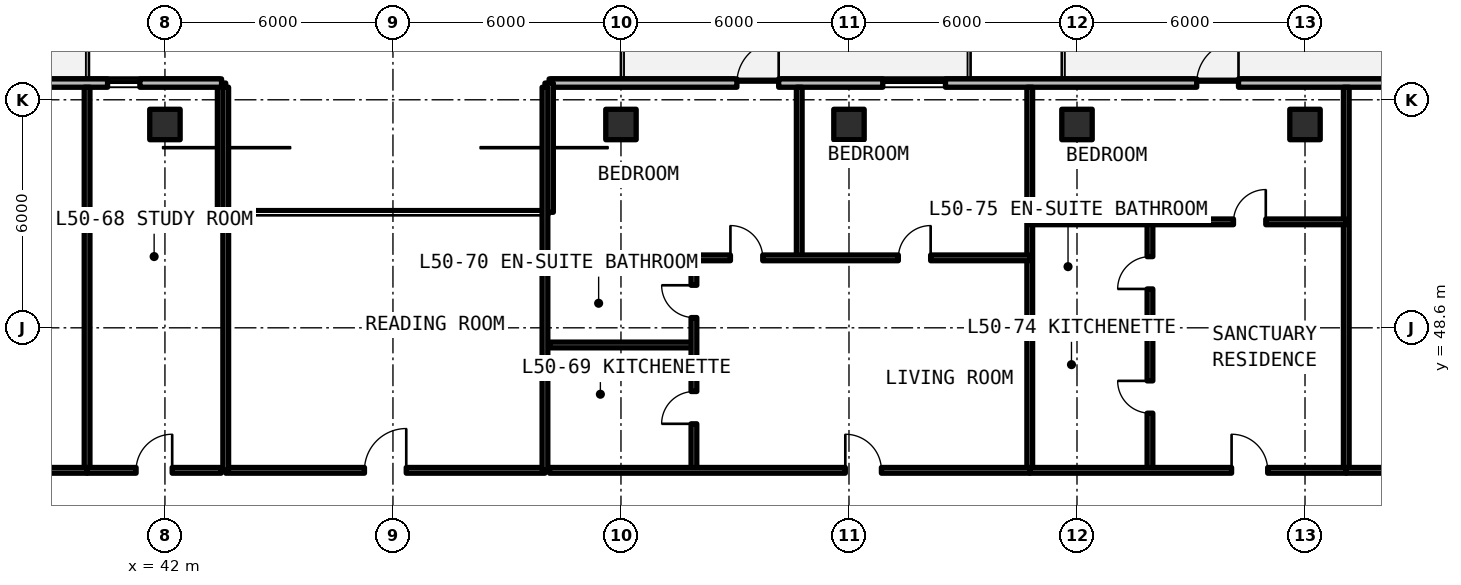
"""IFC4 building model, lengths in metres.
Left out: names, types, materials, properties, quantities, classifications, styles, units other than length and angle.
Written with IfcOpenShell. Run it as: python <this file> out.ifc"""

import sys

from ifc_helpers import new_model, si_unit, direction, frame, frame_2d, origin, origin_2d, place, context, subcontext, project, spatial, rectangle, extrude, element, fill, save


model = new_model("IFC4")
c1 = context("Model", 3, precision=1e-05, world=origin(), true_north=direction((0.0, 1.0)))
c2 = subcontext(c1, "Body", "Model", "MODEL_VIEW")
j1 = project(units=[si_unit("LENGTHUNIT", "METRE"), si_unit("PLANEANGLEUNIT", "RADIAN")], contexts=[c1])
p1 = place(None, origin())
s1 = spatial("IfcSite", under=j1, at=p1, CompositionType="ELEMENT")
p2 = place(p1, origin())
s2 = spatial("IfcBuilding", under=s1, at=p2, CompositionType="ELEMENT")
p3 = place(p2, frame((0.0, 0.0, 181.83)))
s3 = spatial("IfcBuildingStorey", under=s2, at=p3, CompositionType="ELEMENT", Elevation=181.83)
for number, where, z_axis, x_axis in (
    (1, (42.0, 53.95, 0.0), (0.0, 0.0, 1.0), (1.0, 0.0, 0.0)),
    (2, (54.0, 53.95, 0.0), (0.0, 0.0, 1.0), (1.0, 0.0, 0.0)),
    (3, (60.0, 53.95, 0.0), (0.0, 0.0, 1.0), (1.0, 0.0, 0.0)),
    (4, (66.0, 53.95, 0.0), (0.0, 0.0, 1.0), (1.0, 0.0, 0.0)),
    (5, (72.0, 53.95, 0.0), (0.0, 0.0, 1.0), (1.0, 0.0, 0.0)),
):
    element("IfcColumn", number, at=place(p3, frame(where, z_axis=z_axis, x_axis=x_axis)), inside=s3, PredefinedType="COLUMN", context=c2, shape_type="SweptSolid", body=[
        extrude(rectangle(XDim=0.8, YDim=0.8, at=origin_2d()), origin(), (0.0, 0.0, 1.0), 3.3),
    ])
p4 = place(p3, frame((95.354, 55.04, 0.0), z_axis=(0.0, 0.0, 1.0), x_axis=(-1.0, 0.0, 0.0)))
e6 = element("IfcWall", 6, at=p4, inside=s3, PredefinedType="SOLIDWALL", context=c2, shape_type="SweptSolid", body=[
    extrude(rectangle(XDim=43.244, YDim=0.22, at=frame_2d((21.622, 0.0))), origin(), (0.0, 0.0, 1.0), 3.08),
])
p5 = place(p4, frame((37.204, 0.0, 0.0)))
e7 = element("IfcOpeningElement", 7, at=p5, cuts=e6, PredefinedType="OPENING", context=c2, shape_type="SweptSolid", body=[
    extrude(rectangle(XDim=1.1, YDim=2.15, at=frame_2d((0.55, 1.075))), frame((0.0, 0.12, 0.0), z_axis=(0.0, -1.0, 0.0), x_axis=(1.0, 0.0, 0.0)), (0.0, 0.0, 1.0), 0.24),
])
p6 = place(p4, frame((25.104, 0.0, 0.0)))
e8 = element("IfcOpeningElement", 8, at=p6, cuts=e6, PredefinedType="OPENING", context=c2, shape_type="SweptSolid", body=[
    extrude(rectangle(XDim=1.1, YDim=2.15, at=frame_2d((0.55, 1.075))), frame((0.0, 0.12, 0.0), z_axis=(0.0, -1.0, 0.0), x_axis=(1.0, 0.0, 0.0)), (0.0, 0.0, 1.0), 0.24),
])
p7 = place(p4, frame((13.254, 0.0, 0.0)))
e9 = element("IfcOpeningElement", 9, at=p7, cuts=e6, PredefinedType="OPENING", context=c2, shape_type="SweptSolid", body=[
    extrude(rectangle(XDim=1.1, YDim=2.15, at=frame_2d((0.55, 1.075))), frame((0.0, 0.12, 0.0), z_axis=(0.0, -1.0, 0.0), x_axis=(1.0, 0.0, 0.0)), (0.0, 0.0, 1.0), 0.24),
])
p8 = place(p4, frame((32.815, 0.0, 0.78)))
e10 = element("IfcOpeningElement", 10, at=p8, cuts=e6, PredefinedType="OPENING", context=c2, shape_type="SweptSolid", body=[
    extrude(rectangle(XDim=1.65, YDim=1.66, at=frame_2d((0.825, 0.83))), frame((0.0, 0.12, 0.0), z_axis=(0.0, -1.0, 0.0), x_axis=(1.0, 0.0, 0.0)), (0.0, 0.0, 1.0), 0.24),
])
p9 = place(p4, frame((8.458, 0.0, 0.78)))
e11 = element("IfcOpeningElement", 11, at=p9, cuts=e6, PredefinedType="OPENING", context=c2, shape_type="SweptSolid", body=[
    extrude(rectangle(XDim=1.65, YDim=1.66, at=frame_2d((0.825, 0.83))), frame((0.0, 0.12, 0.0), z_axis=(0.0, -1.0, 0.0), x_axis=(1.0, 0.0, 0.0)), (0.0, 0.0, 1.0), 0.24),
])
p10 = place(p4, frame((2.303, 0.0, 0.78)))
e12 = element("IfcOpeningElement", 12, at=p10, cuts=e6, PredefinedType="OPENING", context=c2, shape_type="SweptSolid", body=[
    extrude(rectangle(XDim=1.65, YDim=1.66, at=frame_2d((0.825, 0.83))), frame((0.0, 0.12, 0.0), z_axis=(0.0, -1.0, 0.0), x_axis=(1.0, 0.0, 0.0)), (0.0, 0.0, 1.0), 0.24),
])
for number, where, z_axis, x_axis in (
    (13, (52.11, 55.04, 0.0), (0.0, 0.0, 1.0), (0.0, -1.0, 0.0)),
    (14, (43.49, 51.64, 0.0), (0.0, 0.0, 1.0), (0.0, 1.0, 0.0)),
):
    element("IfcWall", number, at=place(p3, frame(where, z_axis=z_axis, x_axis=x_axis)), inside=s3, PredefinedType="SOLIDWALL", context=c2, shape_type="SweptSolid", body=[
        extrude(rectangle(XDim=3.4, YDim=0.22, at=frame_2d((1.7, 0.0))), origin(), (0.0, 0.0, 1.0), 3.08),
    ])
p11 = place(p3, frame((43.49, 55.04, 0.0), z_axis=(0.0, 0.0, 1.0), x_axis=(-1.0, 0.0, 0.0)))
e15 = element("IfcWall", 15, at=p11, inside=s3, PredefinedType="SOLIDWALL", context=c2, shape_type="SweptSolid", body=[
    extrude(rectangle(XDim=17.644, YDim=0.22, at=frame_2d((8.822, 0.0))), origin(), (0.0, 0.0, 1.0), 3.08),
])
p12 = place(p11, frame((10.29, 0.0, 0.0)))
e16 = element("IfcOpeningElement", 16, at=p12, cuts=e15, PredefinedType="OPENING", context=c2, shape_type="SweptSolid", body=[
    extrude(rectangle(XDim=1.1, YDim=2.15, at=frame_2d((0.55, 1.075))), frame((0.0, 0.12, 0.0), z_axis=(0.0, -1.0, 0.0), x_axis=(1.0, 0.0, 0.0)), (0.0, 0.0, 1.0), 0.24),
])
p13 = place(p11, frame((14.901, 0.0, 0.78)))
e17 = element("IfcOpeningElement", 17, at=p13, cuts=e15, PredefinedType="OPENING", context=c2, shape_type="SweptSolid", body=[
    extrude(rectangle(XDim=1.65, YDim=1.66, at=frame_2d((0.825, 0.83))), frame((0.0, 0.12, 0.0), z_axis=(0.0, -1.0, 0.0), x_axis=(1.0, 0.0, 0.0)), (0.0, 0.0, 1.0), 0.24),
])
p14 = place(p11, frame((4.969, 0.0, 0.78)))
e18 = element("IfcOpeningElement", 18, at=p14, cuts=e15, PredefinedType="OPENING", context=c2, shape_type="SweptSolid", body=[
    extrude(rectangle(XDim=1.65, YDim=1.66, at=frame_2d((0.825, 0.83))), frame((0.0, 0.12, 0.0), z_axis=(0.0, -1.0, 0.0), x_axis=(1.0, 0.0, 0.0)), (0.0, 0.0, 1.0), 0.24),
])
p15 = place(p11, frame((2.149, 0.0, 0.78)))
e19 = element("IfcOpeningElement", 19, at=p15, cuts=e15, PredefinedType="OPENING", context=c2, shape_type="SweptSolid", body=[
    extrude(rectangle(XDim=0.85, YDim=1.65, at=frame_2d((0.425, 0.825))), frame((0.0, 0.12, 0.0), z_axis=(0.0, -1.0, 0.0), x_axis=(1.0, 0.0, 0.0)), (0.0, 0.0, 1.0), 0.24),
])
p16 = place(p3, frame((43.6, 44.85, 0.0), z_axis=(0.0, 0.0, 1.0), x_axis=(1.0, 0.0, 0.0)))
e20 = element("IfcWall", 20, at=p16, inside=s3, PredefinedType="SOLIDWALL", context=c2, shape_type="SweptSolid", body=[
    extrude(rectangle(XDim=8.4, YDim=0.15, at=frame_2d((4.2, 0.0))), origin(), (0.0, 0.0, 1.0), 2.35),
])
p17 = place(p16, frame((3.65, 0.0, 0.0)))
e21 = element("IfcOpeningElement", 21, at=p17, cuts=e20, PredefinedType="OPENING", context=c2, shape_type="SweptSolid", body=[
    extrude(rectangle(XDim=1.1, YDim=2.15, at=frame_2d((0.55, 1.075))), frame((0.0, 0.085, 0.0), z_axis=(0.0, -1.0, 0.0), x_axis=(1.0, 0.0, 0.0)), (0.0, 0.0, 1.0), 0.17),
])
for number, where, z_axis, x_axis in (
    (22, (43.6, 44.85, 0.0), (0.0, 0.0, 1.0), (0.0, 1.0, 0.0)),
    (23, (52.0, 44.85, 0.0), (0.0, 0.0, 1.0), (0.0, 1.0, 0.0)),
    (24, (39.951, 44.85, 0.0), (0.0, 0.0, 1.0), (0.0, 1.0, 0.0)),
):
    element("IfcWall", number, at=place(p3, frame(where, z_axis=z_axis, x_axis=x_axis)), inside=s3, PredefinedType="SOLIDWALL", context=c2, shape_type="SweptSolid", body=[
        extrude(rectangle(XDim=10.08, YDim=0.15, at=frame_2d((5.04, 0.0))), origin(), (0.0, 0.0, 1.0), 2.35),
    ])
p18 = place(p3, frame((33.842, 44.85, 0.0), z_axis=(0.0, 0.0, 1.0), x_axis=(1.0, 0.0, 0.0)))
e25 = element("IfcWall", 25, at=p18, inside=s3, PredefinedType="SOLIDWALL", context=c2, shape_type="SweptSolid", body=[
    extrude(rectangle(XDim=6.11, YDim=0.15, at=frame_2d((3.055, 0.0))), origin(), (0.0, 0.0, 1.0), 2.35),
])
p19 = place(p18, frame((2.58, 0.0, 0.0)))
e26 = element("IfcOpeningElement", 26, at=p19, cuts=e25, PredefinedType="OPENING", context=c2, shape_type="SweptSolid", body=[
    extrude(rectangle(XDim=0.95, YDim=2.15, at=frame_2d((0.475, 1.075))), frame((0.0, 0.085, 0.0), z_axis=(0.0, -1.0, 0.0), x_axis=(1.0, 0.0, 0.0)), (0.0, 0.0, 1.0), 0.17),
])
p20 = place(p3, frame((39.951, 44.85, 0.0), z_axis=(0.0, 0.0, 1.0), x_axis=(1.0, 0.0, 0.0)))
e27 = element("IfcWall", 27, at=p20, inside=s3, PredefinedType="SOLIDWALL", context=c2, shape_type="SweptSolid", body=[
    extrude(rectangle(XDim=3.529, YDim=0.15, at=frame_2d((1.764, 0.0))), origin(), (0.0, 0.0, 1.0), 2.35),
])
p21 = place(p20, frame((1.289, 0.0, 0.0)))
e28 = element("IfcOpeningElement", 28, at=p21, cuts=e27, PredefinedType="OPENING", context=c2, shape_type="SweptSolid", body=[
    extrude(rectangle(XDim=0.95, YDim=2.15, at=frame_2d((0.475, 1.075))), frame((0.0, 0.085, 0.0), z_axis=(0.0, -1.0, 0.0), x_axis=(1.0, 0.0, 0.0)), (0.0, 0.0, 1.0), 0.17),
])
p22 = place(p3, frame((64.757, 44.85, 0.0), z_axis=(0.0, 0.0, 1.0), x_axis=(0.0, 1.0, 0.0)))
e29 = element("IfcWall", 29, at=p22, inside=s3, PredefinedType="SOLIDWALL", context=c2, shape_type="SweptSolid", body=[
    extrude(rectangle(XDim=10.08, YDim=0.15, at=frame_2d((5.04, 0.0))), origin(), (0.0, 0.0, 1.0), 2.35),
])
p23 = place(p3, frame((52.12, 48.148, 0.0), z_axis=(0.0, 0.0, 1.0), x_axis=(1.0, 0.0, 0.0)))
e30 = element("IfcWall", 30, at=p23, inside=s3, PredefinedType="PARTITIONING", context=c2, shape_type="SweptSolid", body=[
    extrude(rectangle(XDim=3.8, YDim=0.15, at=frame_2d((1.9, 0.0))), origin(), (0.0, 0.0, 1.0), 2.35),
])
p24 = place(p3, frame((55.92, 44.85, 0.0), z_axis=(0.0, 0.0, 1.0), x_axis=(0.0, 1.0, 0.0)))
e31 = element("IfcWall", 31, at=p24, inside=s3, PredefinedType="PARTITIONING", context=c2, shape_type="SweptSolid", body=[
    extrude(rectangle(XDim=5.591, YDim=0.15, at=frame_2d((2.795, 0.0))), origin(), (0.0, 0.0, 1.0), 2.35),
])
p25 = place(p24, frame((1.224, 0.0, 0.0)))
e32 = element("IfcOpeningElement", 32, at=p25, cuts=e31, PredefinedType="OPENING", context=c2, shape_type="SweptSolid", body=[
    extrude(rectangle(XDim=0.85, YDim=2.1, at=frame_2d((0.425, 1.05))), frame((0.0, 0.085, 0.0), z_axis=(0.0, -1.0, 0.0), x_axis=(1.0, 0.0, 0.0)), (0.0, 0.0, 1.0), 0.17),
])
p26 = place(p24, frame((4.02, 0.0, 0.0)))
e33 = element("IfcOpeningElement", 33, at=p26, cuts=e31, PredefinedType="OPENING", context=c2, shape_type="SweptSolid", body=[
    extrude(rectangle(XDim=0.85, YDim=2.1, at=frame_2d((0.425, 1.05))), frame((0.0, 0.085, 0.0), z_axis=(0.0, -1.0, 0.0), x_axis=(1.0, 0.0, 0.0)), (0.0, 0.0, 1.0), 0.17),
])
p27 = place(p3, frame((58.691, 50.441, 0.0), z_axis=(0.0, 0.0, 1.0), x_axis=(0.0, 1.0, 0.0)))
e34 = element("IfcWall", 34, at=p27, inside=s3, PredefinedType="PARTITIONING", context=c2, shape_type="SweptSolid", body=[
    extrude(rectangle(XDim=4.489, YDim=0.15, at=frame_2d((2.245, 0.0))), origin(), (0.0, 0.0, 1.0), 2.35),
])
p28 = place(p3, frame((52.12, 50.441, 0.0), z_axis=(0.0, 0.0, 1.0), x_axis=(1.0, 0.0, 0.0)))
e35 = element("IfcWall", 35, at=p28, inside=s3, PredefinedType="PARTITIONING", context=c2, shape_type="SweptSolid", body=[
    extrude(rectangle(XDim=12.637, YDim=0.15, at=frame_2d((6.318, 0.0))), origin(), (0.0, 0.0, 1.0), 2.35),
])
p29 = place(p28, frame((4.76, 0.0, 0.0)))
e36 = element("IfcOpeningElement", 36, at=p29, cuts=e35, PredefinedType="OPENING", context=c2, shape_type="SweptSolid", body=[
    extrude(rectangle(XDim=0.85, YDim=2.1, at=frame_2d((0.425, 1.05))), frame((0.0, 0.085, 0.0), z_axis=(0.0, -1.0, 0.0), x_axis=(1.0, 0.0, 0.0)), (0.0, 0.0, 1.0), 0.17),
])
p30 = place(p28, frame((9.179, 0.0, 0.0)))
e37 = element("IfcOpeningElement", 37, at=p30, cuts=e35, PredefinedType="OPENING", context=c2, shape_type="SweptSolid", body=[
    extrude(rectangle(XDim=0.85, YDim=2.1, at=frame_2d((0.425, 1.05))), frame((0.0, 0.085, 0.0), z_axis=(0.0, -1.0, 0.0), x_axis=(1.0, 0.0, 0.0)), (0.0, 0.0, 1.0), 0.17),
])
p31 = place(p3, frame((52.12, 44.85, 0.0), z_axis=(0.0, 0.0, 1.0), x_axis=(1.0, 0.0, 0.0)))
e38 = element("IfcWall", 38, at=p31, inside=s3, PredefinedType="SOLIDWALL", context=c2, shape_type="SweptSolid", body=[
    extrude(rectangle(XDim=12.637, YDim=0.15, at=frame_2d((6.318, 0.0))), origin(), (0.0, 0.0, 1.0), 2.35),
])
p32 = place(p31, frame((7.783, 0.0, 0.0)))
e39 = element("IfcOpeningElement", 39, at=p32, cuts=e38, PredefinedType="OPENING", context=c2, shape_type="SweptSolid", body=[
    extrude(rectangle(XDim=0.95, YDim=2.15, at=frame_2d((0.475, 1.075))), frame((0.0, 0.085, 0.0), z_axis=(0.0, -1.0, 0.0), x_axis=(1.0, 0.0, 0.0)), (0.0, 0.0, 1.0), 0.17),
])
p33 = place(p3, frame((73.086, 44.85, 0.0), z_axis=(0.0, 0.0, 1.0), x_axis=(0.0, 1.0, 0.0)))
e40 = element("IfcWall", 40, at=p33, inside=s3, PredefinedType="SOLIDWALL", context=c2, shape_type="SweptSolid", body=[
    extrude(rectangle(XDim=10.08, YDim=0.15, at=frame_2d((5.04, 0.0))), origin(), (0.0, 0.0, 1.0), 2.35),
])
p34 = place(p3, frame((64.757, 48.708, 0.0), z_axis=(0.0, 0.0, 1.0), x_axis=(1.0, 0.0, 0.0)))
e41 = element("IfcWall", 41, at=p34, inside=s3, PredefinedType="PARTITIONING", context=c2, shape_type="SweptSolid", body=[
    extrude(rectangle(XDim=3.163, YDim=0.15, at=frame_2d((1.582, 0.0))), origin(), (0.0, 0.0, 1.0), 2.35),
])
p35 = place(p3, frame((67.92, 44.85, 0.0), z_axis=(0.0, 0.0, 1.0), x_axis=(0.0, 1.0, 0.0)))
e42 = element("IfcWall", 42, at=p35, inside=s3, PredefinedType="PARTITIONING", context=c2, shape_type="SweptSolid", body=[
    extrude(rectangle(XDim=6.538, YDim=0.15, at=frame_2d((3.269, 0.0))), origin(), (0.0, 0.0, 1.0), 2.35),
])
p36 = place(p35, frame((1.504, 0.0, 0.0)))
e43 = element("IfcOpeningElement", 43, at=p36, cuts=e42, PredefinedType="OPENING", context=c2, shape_type="SweptSolid", body=[
    extrude(rectangle(XDim=0.85, YDim=2.1, at=frame_2d((0.425, 1.05))), frame((0.0, 0.085, 0.0), z_axis=(0.0, -1.0, 0.0), x_axis=(1.0, 0.0, 0.0)), (0.0, 0.0, 1.0), 0.17),
])
p37 = place(p35, frame((4.773, 0.0, 0.0)))
e44 = element("IfcOpeningElement", 44, at=p37, cuts=e42, PredefinedType="OPENING", context=c2, shape_type="SweptSolid", body=[
    extrude(rectangle(XDim=0.85, YDim=2.1, at=frame_2d((0.425, 1.05))), frame((0.0, 0.085, 0.0), z_axis=(0.0, -1.0, 0.0), x_axis=(1.0, 0.0, 0.0)), (0.0, 0.0, 1.0), 0.17),
])
p38 = place(p3, frame((64.757, 51.388, 0.0), z_axis=(0.0, 0.0, 1.0), x_axis=(1.0, 0.0, 0.0)))
e45 = element("IfcWall", 45, at=p38, inside=s3, PredefinedType="PARTITIONING", context=c2, shape_type="SweptSolid", body=[
    extrude(rectangle(XDim=8.329, YDim=0.15, at=frame_2d((4.165, 0.0))), origin(), (0.0, 0.0, 1.0), 2.35),
])
p39 = place(p38, frame((5.361, 0.0, 0.0)))
e46 = element("IfcOpeningElement", 46, at=p39, cuts=e45, PredefinedType="OPENING", context=c2, shape_type="SweptSolid", body=[
    extrude(rectangle(XDim=0.85, YDim=2.1, at=frame_2d((0.425, 1.05))), frame((0.0, 0.085, 0.0), z_axis=(0.0, -1.0, 0.0), x_axis=(1.0, 0.0, 0.0)), (0.0, 0.0, 1.0), 0.17),
])
p40 = place(p3, frame((64.757, 44.85, 0.0), z_axis=(0.0, 0.0, 1.0), x_axis=(1.0, 0.0, 0.0)))
e47 = element("IfcWall", 47, at=p40, inside=s3, PredefinedType="SOLIDWALL", context=c2, shape_type="SweptSolid", body=[
    extrude(rectangle(XDim=8.329, YDim=0.15, at=frame_2d((4.165, 0.0))), origin(), (0.0, 0.0, 1.0), 2.35),
])
p41 = place(p40, frame((5.311, 0.0, 0.0)))
e48 = element("IfcOpeningElement", 48, at=p41, cuts=e47, PredefinedType="OPENING", context=c2, shape_type="SweptSolid", body=[
    extrude(rectangle(XDim=0.95, YDim=2.15, at=frame_2d((0.475, 1.075))), frame((0.0, 0.085, 0.0), z_axis=(0.0, -1.0, 0.0), x_axis=(1.0, 0.0, 0.0)), (0.0, 0.0, 1.0), 0.17),
])
p42 = place(p3, frame((73.086, 44.85, 0.0), z_axis=(0.0, 0.0, 1.0), x_axis=(1.0, 0.0, 0.0)))
e49 = element("IfcWall", 49, at=p42, inside=s3, PredefinedType="SOLIDWALL", context=c2, shape_type="SweptSolid", body=[
    extrude(rectangle(XDim=9.765, YDim=0.15, at=frame_2d((4.882, 0.0))), origin(), (0.0, 0.0, 1.0), 2.35),
])
p43 = place(p42, frame((4.333, 0.0, 0.0)))
e50 = element("IfcOpeningElement", 50, at=p43, cuts=e49, PredefinedType="OPENING", context=c2, shape_type="SweptSolid", body=[
    extrude(rectangle(XDim=1.1, YDim=2.15, at=frame_2d((0.55, 1.075))), frame((0.0, 0.085, 0.0), z_axis=(0.0, -1.0, 0.0), x_axis=(1.0, 0.0, 0.0)), (0.0, 0.0, 1.0), 0.17),
])
p44 = place(p5, frame((1.1, 0.0, 0.0), z_axis=(0.0, 0.0, 1.0), x_axis=(-1.0, 0.0, 0.0)))
e51 = element("IfcDoor", 51, at=p44, inside=s3, OperationType="SINGLE_SWING_RIGHT", PredefinedType="DOOR", context=c2, shape_type="SweptSolid", body=[
    extrude(rectangle(XDim=1.1, YDim=2.15, at=frame_2d((0.55, 1.075))), frame((0.0, 0.025, 0.0), z_axis=(0.0, -1.0, 0.0), x_axis=(1.0, 0.0, 0.0)), (0.0, 0.0, 1.0), 0.05),
])
fill(e7, e51)
p45 = place(p6, frame((1.1, 0.0, 0.0), z_axis=(0.0, 0.0, 1.0), x_axis=(-1.0, 0.0, 0.0)))
e52 = element("IfcDoor", 52, at=p45, inside=s3, OperationType="SINGLE_SWING_LEFT", PredefinedType="DOOR", context=c2, shape_type="SweptSolid", body=[
    extrude(rectangle(XDim=1.1, YDim=2.15, at=frame_2d((0.55, 1.075))), frame((0.0, 0.025, 0.0), z_axis=(0.0, -1.0, 0.0), x_axis=(1.0, 0.0, 0.0)), (0.0, 0.0, 1.0), 0.05),
])
fill(e8, e52)
p46 = place(p8, origin())
e53 = element("IfcWindow", 53, at=p46, inside=s3, PartitioningType="SINGLE_PANEL", PredefinedType="WINDOW", context=c2, shape_type="SweptSolid", body=[
    extrude(rectangle(XDim=1.65, YDim=1.66, at=frame_2d((0.825, 0.83))), frame((0.0, 0.03, 0.0), z_axis=(0.0, -1.0, 0.0), x_axis=(1.0, 0.0, 0.0)), (0.0, 0.0, 1.0), 0.06),
])
fill(e10, e53)
p47 = place(p15, origin())
e54 = element("IfcWindow", 54, at=p47, inside=s3, PartitioningType="SINGLE_PANEL", PredefinedType="WINDOW", context=c2, shape_type="SweptSolid", body=[
    extrude(rectangle(XDim=0.85, YDim=1.65, at=frame_2d((0.425, 0.825))), frame((0.0, 0.03, 0.0), z_axis=(0.0, -1.0, 0.0), x_axis=(1.0, 0.0, 0.0)), (0.0, 0.0, 1.0), 0.06),
])
fill(e19, e54)
p48 = place(p17, origin())
e55 = element("IfcDoor", 55, at=p48, inside=s3, OperationType="SINGLE_SWING_RIGHT", PredefinedType="DOOR", context=c2, shape_type="SweptSolid", body=[
    extrude(rectangle(XDim=1.1, YDim=2.15, at=frame_2d((0.55, 1.075))), frame((0.0, 0.025, 0.0), z_axis=(0.0, -1.0, 0.0), x_axis=(1.0, 0.0, 0.0)), (0.0, 0.0, 1.0), 0.05),
])
fill(e21, e55)
p49 = place(p21, origin())
e56 = element("IfcDoor", 56, at=p49, inside=s3, OperationType="SINGLE_SWING_RIGHT", PredefinedType="DOOR", context=c2, shape_type="SweptSolid", body=[
    extrude(rectangle(XDim=0.95, YDim=2.15, at=frame_2d((0.475, 1.075))), frame((0.0, 0.025, 0.0), z_axis=(0.0, -1.0, 0.0), x_axis=(1.0, 0.0, 0.0)), (0.0, 0.0, 1.0), 0.05),
])
fill(e28, e56)
p50 = place(p25, origin())
e57 = element("IfcDoor", 57, at=p50, inside=s3, OperationType="SINGLE_SWING_LEFT", PredefinedType="DOOR", context=c2, shape_type="SweptSolid", body=[
    extrude(rectangle(XDim=0.85, YDim=2.1, at=frame_2d((0.425, 1.05))), frame((0.0, 0.025, 0.0), z_axis=(0.0, -1.0, 0.0), x_axis=(1.0, 0.0, 0.0)), (0.0, 0.0, 1.0), 0.05),
])
fill(e32, e57)
p51 = place(p26, origin())
e58 = element("IfcDoor", 58, at=p51, inside=s3, OperationType="SINGLE_SWING_RIGHT", PredefinedType="DOOR", context=c2, shape_type="SweptSolid", body=[
    extrude(rectangle(XDim=0.85, YDim=2.1, at=frame_2d((0.425, 1.05))), frame((0.0, 0.025, 0.0), z_axis=(0.0, -1.0, 0.0), x_axis=(1.0, 0.0, 0.0)), (0.0, 0.0, 1.0), 0.05),
])
fill(e33, e58)
p52 = place(p29, origin())
e59 = element("IfcDoor", 59, at=p52, inside=s3, OperationType="SINGLE_SWING_LEFT", PredefinedType="DOOR", context=c2, shape_type="SweptSolid", body=[
    extrude(rectangle(XDim=0.85, YDim=2.1, at=frame_2d((0.425, 1.05))), frame((0.0, 0.025, 0.0), z_axis=(0.0, -1.0, 0.0), x_axis=(1.0, 0.0, 0.0)), (0.0, 0.0, 1.0), 0.05),
])
fill(e36, e59)
p53 = place(p30, origin())
e60 = element("IfcDoor", 60, at=p53, inside=s3, OperationType="SINGLE_SWING_RIGHT", PredefinedType="DOOR", context=c2, shape_type="SweptSolid", body=[
    extrude(rectangle(XDim=0.85, YDim=2.1, at=frame_2d((0.425, 1.05))), frame((0.0, 0.025, 0.0), z_axis=(0.0, -1.0, 0.0), x_axis=(1.0, 0.0, 0.0)), (0.0, 0.0, 1.0), 0.05),
])
fill(e37, e60)
p54 = place(p32, origin())
e61 = element("IfcDoor", 61, at=p54, inside=s3, OperationType="SINGLE_SWING_LEFT", PredefinedType="DOOR", context=c2, shape_type="SweptSolid", body=[
    extrude(rectangle(XDim=0.95, YDim=2.15, at=frame_2d((0.475, 1.075))), frame((0.0, 0.025, 0.0), z_axis=(0.0, -1.0, 0.0), x_axis=(1.0, 0.0, 0.0)), (0.0, 0.0, 1.0), 0.05),
])
fill(e39, e61)
p55 = place(p36, origin())
e62 = element("IfcDoor", 62, at=p55, inside=s3, OperationType="SINGLE_SWING_RIGHT", PredefinedType="DOOR", context=c2, shape_type="SweptSolid", body=[
    extrude(rectangle(XDim=0.85, YDim=2.1, at=frame_2d((0.425, 1.05))), frame((0.0, 0.025, 0.0), z_axis=(0.0, -1.0, 0.0), x_axis=(1.0, 0.0, 0.0)), (0.0, 0.0, 1.0), 0.05),
])
fill(e43, e62)
p56 = place(p37, origin())
e63 = element("IfcDoor", 63, at=p56, inside=s3, OperationType="SINGLE_SWING_LEFT", PredefinedType="DOOR", context=c2, shape_type="SweptSolid", body=[
    extrude(rectangle(XDim=0.85, YDim=2.1, at=frame_2d((0.425, 1.05))), frame((0.0, 0.025, 0.0), z_axis=(0.0, -1.0, 0.0), x_axis=(1.0, 0.0, 0.0)), (0.0, 0.0, 1.0), 0.05),
])
fill(e44, e63)
p57 = place(p39, origin())
e64 = element("IfcDoor", 64, at=p57, inside=s3, OperationType="SINGLE_SWING_RIGHT", PredefinedType="DOOR", context=c2, shape_type="SweptSolid", body=[
    extrude(rectangle(XDim=0.85, YDim=2.1, at=frame_2d((0.425, 1.05))), frame((0.0, 0.025, 0.0), z_axis=(0.0, -1.0, 0.0), x_axis=(1.0, 0.0, 0.0)), (0.0, 0.0, 1.0), 0.05),
])
fill(e46, e64)
p58 = place(p41, origin())
e65 = element("IfcDoor", 65, at=p58, inside=s3, OperationType="SINGLE_SWING_LEFT", PredefinedType="DOOR", context=c2, shape_type="SweptSolid", body=[
    extrude(rectangle(XDim=0.95, YDim=2.15, at=frame_2d((0.475, 1.075))), frame((0.0, 0.025, 0.0), z_axis=(0.0, -1.0, 0.0), x_axis=(1.0, 0.0, 0.0)), (0.0, 0.0, 1.0), 0.05),
])
fill(e48, e65)
save(model, sys.argv[1])
